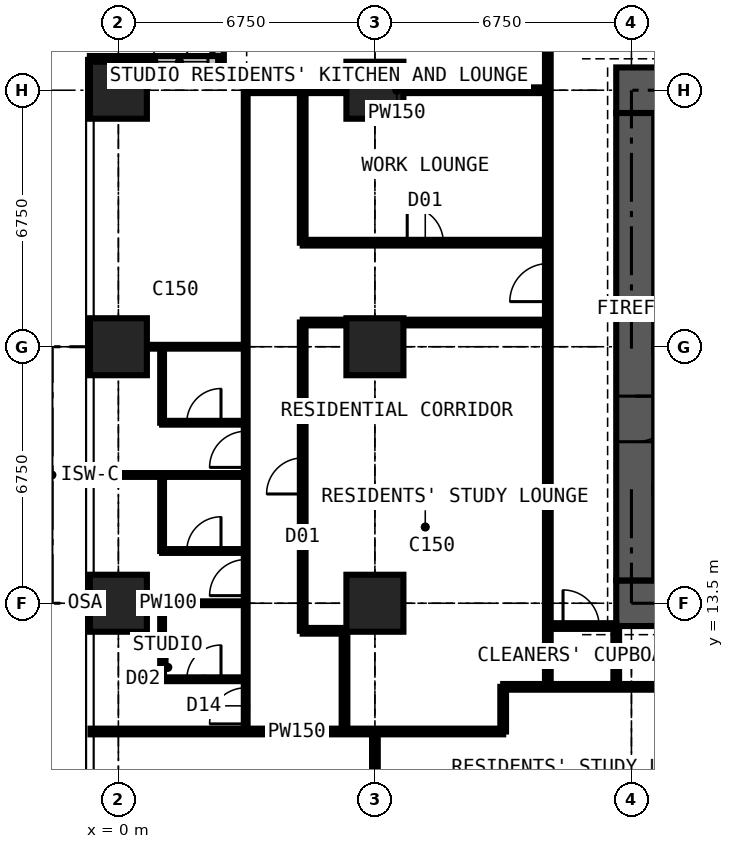
"""IFC4 building model, lengths in metres.
Left out: names, types, materials, properties, quantities, classifications, styles, units other than length and angle.
Written with IfcOpenShell. Run it as: python <this file> out.ifc"""

import sys

from ifc_helpers import new_model, si_unit, direction, frame, frame_2d, origin, origin_2d, place, context, subcontext, project, spatial, rectangle, extrude, element, fill, save


model = new_model("IFC4")
c1 = context("Model", 3, precision=1e-05, world=origin(), true_north=direction((0.0, 1.0)))
c2 = subcontext(c1, "Body", "Model", "MODEL_VIEW")
j1 = project(units=[si_unit("LENGTHUNIT", "METRE"), si_unit("PLANEANGLEUNIT", "RADIAN")], contexts=[c1])
p1 = place(None, origin())
s1 = spatial("IfcSite", under=j1, at=p1, CompositionType="ELEMENT")
p2 = place(p1, origin())
s2 = spatial("IfcBuilding", under=s1, at=p2, CompositionType="ELEMENT")
p3 = place(p2, frame((0.0, 0.0, 167.4)))
s3 = spatial("IfcBuildingStorey", under=s2, at=p3, CompositionType="ELEMENT", Elevation=167.4)
for number, where, z_axis, x_axis in (
    (1, (0.0, 13.5, 0.0), (0.0, 0.0, 1.0), (1.0, 0.0, 0.0)),
    (2, (0.0, 20.25, 0.0), (0.0, 0.0, 1.0), (1.0, 0.0, 0.0)),
    (3, (0.0, 27.0, 0.0), (0.0, 0.0, 1.0), (1.0, 0.0, 0.0)),
    (4, (6.75, 13.5, 0.0), (0.0, 0.0, 1.0), (1.0, 0.0, 0.0)),
    (5, (6.75, 20.25, 0.0), (0.0, 0.0, 1.0), (1.0, 0.0, 0.0)),
    (6, (6.75, 27.0, 0.0), (0.0, 0.0, 1.0), (1.0, 0.0, 0.0)),
):
    element("IfcColumn", number, at=place(p3, frame(where, z_axis=z_axis, x_axis=x_axis)), inside=s3, PredefinedType="COLUMN", context=c2, shape_type="SweptSolid", body=[
        extrude(rectangle(XDim=1.5, YDim=1.5, at=origin_2d()), origin(), (0.0, 0.0, 1.0), 3.6),
    ])
p4 = place(p3, frame((13.1, 13.5, 0.0), z_axis=(0.0, 0.0, 1.0), x_axis=(1.0, 0.0, 0.0)))
e7 = element("IfcWall", 7, at=p4, inside=s3, PredefinedType="SHEAR", context=c2, shape_type="SweptSolid", body=[
    extrude(rectangle(XDim=14.3, YDim=1.2, at=frame_2d((7.15, 0.0))), origin(), (0.0, 0.0, 1.0), 3.6),
])
p5 = place(p3, frame((27.4, 27.0, 0.0), z_axis=(0.0, 0.0, 1.0), x_axis=(-1.0, 0.0, 0.0)))
e8 = element("IfcWall", 8, at=p5, inside=s3, PredefinedType="SHEAR", context=c2, shape_type="SweptSolid", body=[
    extrude(rectangle(XDim=14.3, YDim=1.2, at=frame_2d((7.15, 0.0))), origin(), (0.0, 0.0, 1.0), 3.6),
])
p6 = place(p5, frame((4.55, 0.0, 0.0)))
e9 = element("IfcOpeningElement", 9, at=p6, cuts=e8, PredefinedType="OPENING", context=c2, shape_type="SweptSolid", body=[
    extrude(rectangle(XDim=0.9, YDim=2.2, at=frame_2d((0.45, 1.1))), frame((0.0, 0.61, 0.0), z_axis=(0.0, -1.0, 0.0), x_axis=(1.0, 0.0, 0.0)), (0.0, 0.0, 1.0), 1.22),
])
p7 = place(p5, frame((7.525, 0.0, 0.0)))
e10 = element("IfcOpeningElement", 10, at=p7, cuts=e8, PredefinedType="OPENING", context=c2, shape_type="SweptSolid", body=[
    extrude(rectangle(XDim=1.0, YDim=2.2, at=frame_2d((0.5, 1.1))), frame((0.0, 0.61, 0.0), z_axis=(0.0, -1.0, 0.0), x_axis=(1.0, 0.0, 0.0)), (0.0, 0.0, 1.0), 1.22),
])
p8 = place(p3, frame((13.6, 26.4, 0.0), z_axis=(0.0, 0.0, 1.0), x_axis=(0.0, -1.0, 0.0)))
e11 = element("IfcWall", 11, at=p8, inside=s3, PredefinedType="SHEAR", context=c2, shape_type="SweptSolid", body=[
    extrude(rectangle(XDim=12.3, YDim=1.0, at=frame_2d((6.15, 0.0))), origin(), (0.0, 0.0, 1.0), 3.6),
])
p9 = place(p8, frame((7.45, 0.0, 0.0)))
e12 = element("IfcOpeningElement", 12, at=p9, cuts=e11, PredefinedType="OPENING", context=c2, shape_type="SweptSolid", body=[
    extrude(rectangle(XDim=1.2, YDim=2.2, at=frame_2d((0.6, 1.1))), frame((0.0, 0.51, 0.0), z_axis=(0.0, -1.0, 0.0), x_axis=(1.0, 0.0, 0.0)), (0.0, 0.0, 1.0), 1.02),
])
p10 = place(p3, frame((2.625, 31.125, 0.0), z_axis=(0.0, 0.0, 1.0), x_axis=(0.0, -1.0, 0.0)))
e13 = element("IfcWall", 13, at=p10, inside=s3, PredefinedType="SOLIDWALL", context=c2, shape_type="SweptSolid", body=[
    extrude(rectangle(XDim=3.375, YDim=0.3, at=frame_2d((1.688, 0.0))), origin(), (0.0, 0.0, 1.0), 3.375),
])
p11 = place(p10, frame((0.788, 0.0, 0.6)))
e14 = element("IfcOpeningElement", 14, at=p11, cuts=e13, PredefinedType="OPENING", context=c2, shape_type="SweptSolid", body=[
    extrude(rectangle(XDim=1.8, YDim=2.1, at=frame_2d((0.9, 1.05))), frame((0.0, 0.16, 0.0), z_axis=(0.0, -1.0, 0.0), x_axis=(1.0, 0.0, 0.0)), (0.0, 0.0, 1.0), 0.32),
])
p12 = place(p3, frame((2.625, 27.75, 0.0), z_axis=(0.0, 0.0, 1.0), x_axis=(-1.0, 0.0, 0.0)))
e15 = element("IfcWall", 15, at=p12, inside=s3, PredefinedType="SOLIDWALL", context=c2, shape_type="SweptSolid", body=[
    extrude(rectangle(XDim=3.375, YDim=0.3, at=frame_2d((1.688, 0.0))), origin(), (0.0, 0.0, 1.0), 3.375),
])
p13 = place(p12, frame((0.268, 0.0, 0.9)))
e16 = element("IfcOpeningElement", 16, at=p13, cuts=e15, PredefinedType="OPENING", context=c2, shape_type="SweptSolid", body=[
    extrude(rectangle(XDim=1.5, YDim=1.8, at=frame_2d((0.75, 0.9))), frame((0.0, 0.16, 0.0), z_axis=(0.0, -1.0, 0.0), x_axis=(1.0, 0.0, 0.0)), (0.0, 0.0, 1.0), 0.32),
])
p14 = place(p3, frame((-0.734, 10.125, 0.0), z_axis=(0.0, 0.0, 1.0), x_axis=(1.0, 0.0, 0.0)))
e17 = element("IfcWall", 17, at=p14, inside=s3, PredefinedType="PARTITIONING", context=c2, shape_type="SweptSolid", body=[
    extrude(rectangle(XDim=10.859, YDim=0.15, at=frame_2d((5.429, 0.0))), origin(), (0.0, 0.0, 1.0), 3.375),
])
p15 = place(p3, frame((-0.734, 13.5, 0.0), z_axis=(0.0, 0.0, 1.0), x_axis=(1.0, 0.0, 0.0)))
e18 = element("IfcWall", 18, at=p15, inside=s3, PredefinedType="PARTITIONING", context=c2, shape_type="SweptSolid", body=[
    extrude(rectangle(XDim=4.084, YDim=0.1, at=frame_2d((2.042, 0.0))), origin(), (0.0, 0.0, 1.0), 2.61),
])
p16 = place(p3, frame((-0.734, 16.875, 0.0), z_axis=(0.0, 0.0, 1.0), x_axis=(1.0, 0.0, 0.0)))
e19 = element("IfcWall", 19, at=p16, inside=s3, PredefinedType="PARTITIONING", context=c2, shape_type="SweptSolid", body=[
    extrude(rectangle(XDim=4.084, YDim=0.1, at=frame_2d((2.042, 0.0))), origin(), (0.0, 0.0, 1.0), 3.375),
])
p17 = place(p3, frame((-0.734, 20.25, 0.0), z_axis=(0.0, 0.0, 1.0), x_axis=(1.0, 0.0, 0.0)))
e20 = element("IfcWall", 20, at=p17, inside=s3, PredefinedType="PARTITIONING", context=c2, shape_type="SweptSolid", body=[
    extrude(rectangle(XDim=4.084, YDim=0.1, at=frame_2d((2.042, 0.0))), origin(), (0.0, 0.0, 1.0), 2.61),
])
p18 = place(p3, frame((1.15, 11.5, 0.0), z_axis=(0.0, 0.0, 1.0), x_axis=(0.0, 1.0, 0.0)))
e21 = element("IfcWall", 21, at=p18, inside=s3, PredefinedType="PARTITIONING", context=c2, shape_type="SweptSolid", body=[
    extrude(rectangle(XDim=2.0, YDim=0.1, at=frame_2d((1.0, 0.0))), origin(), (0.0, 0.0, 1.0), 3.375),
])
p19 = place(p3, frame((1.15, 11.5, 0.0), z_axis=(0.0, 0.0, 1.0), x_axis=(1.0, 0.0, 0.0)))
e22 = element("IfcWall", 22, at=p19, inside=s3, PredefinedType="PARTITIONING", context=c2, shape_type="SweptSolid", body=[
    extrude(rectangle(XDim=2.2, YDim=0.1, at=frame_2d((1.1, 0.0))), origin(), (0.0, 0.0, 1.0), 3.375),
])
p20 = place(p19, frame((0.65, 0.0, 0.0)))
e23 = element("IfcOpeningElement", 23, at=p20, cuts=e22, PredefinedType="OPENING", context=c2, shape_type="SweptSolid", body=[
    extrude(rectangle(XDim=0.9, YDim=2.2, at=frame_2d((0.45, 1.1))), frame((0.0, 0.06, 0.0), z_axis=(0.0, -1.0, 0.0), x_axis=(1.0, 0.0, 0.0)), (0.0, 0.0, 1.0), 0.12),
])
p21 = place(p3, frame((1.15, 14.875, 0.0), z_axis=(0.0, 0.0, 1.0), x_axis=(0.0, 1.0, 0.0)))
e24 = element("IfcWall", 24, at=p21, inside=s3, PredefinedType="PARTITIONING", context=c2, shape_type="SweptSolid", body=[
    extrude(rectangle(XDim=2.0, YDim=0.1, at=frame_2d((1.0, 0.0))), origin(), (0.0, 0.0, 1.0), 3.375),
])
p22 = place(p3, frame((1.15, 14.875, 0.0), z_axis=(0.0, 0.0, 1.0), x_axis=(1.0, 0.0, 0.0)))
e25 = element("IfcWall", 25, at=p22, inside=s3, PredefinedType="PARTITIONING", context=c2, shape_type="SweptSolid", body=[
    extrude(rectangle(XDim=2.2, YDim=0.1, at=frame_2d((1.1, 0.0))), origin(), (0.0, 0.0, 1.0), 3.375),
])
p23 = place(p22, frame((0.65, 0.0, 0.0)))
e26 = element("IfcOpeningElement", 26, at=p23, cuts=e25, PredefinedType="OPENING", context=c2, shape_type="SweptSolid", body=[
    extrude(rectangle(XDim=0.9, YDim=2.2, at=frame_2d((0.45, 1.1))), frame((0.0, 0.06, 0.0), z_axis=(0.0, -1.0, 0.0), x_axis=(1.0, 0.0, 0.0)), (0.0, 0.0, 1.0), 0.12),
])
p24 = place(p3, frame((1.15, 18.25, 0.0), z_axis=(0.0, 0.0, 1.0), x_axis=(0.0, 1.0, 0.0)))
e27 = element("IfcWall", 27, at=p24, inside=s3, PredefinedType="PARTITIONING", context=c2, shape_type="SweptSolid", body=[
    extrude(rectangle(XDim=2.0, YDim=0.1, at=frame_2d((1.0, 0.0))), origin(), (0.0, 0.0, 1.0), 3.375),
])
p25 = place(p3, frame((1.15, 18.25, 0.0), z_axis=(0.0, 0.0, 1.0), x_axis=(1.0, 0.0, 0.0)))
e28 = element("IfcWall", 28, at=p25, inside=s3, PredefinedType="PARTITIONING", context=c2, shape_type="SweptSolid", body=[
    extrude(rectangle(XDim=2.2, YDim=0.1, at=frame_2d((1.1, 0.0))), origin(), (0.0, 0.0, 1.0), 3.375),
])
p26 = place(p25, frame((0.65, 0.0, 0.0)))
e29 = element("IfcOpeningElement", 29, at=p26, cuts=e28, PredefinedType="OPENING", context=c2, shape_type="SweptSolid", body=[
    extrude(rectangle(XDim=0.9, YDim=2.2, at=frame_2d((0.45, 1.1))), frame((0.0, 0.06, 0.0), z_axis=(0.0, -1.0, 0.0), x_axis=(1.0, 0.0, 0.0)), (0.0, 0.0, 1.0), 0.12),
])
p27 = place(p3, frame((3.35, 10.125, 0.0), z_axis=(0.0, 0.0, 1.0), x_axis=(0.0, 1.0, 0.0)))
e30 = element("IfcWall", 30, at=p27, inside=s3, PredefinedType="PARTITIONING", context=c2, shape_type="SweptSolid", body=[
    extrude(rectangle(XDim=16.875, YDim=0.1, at=frame_2d((8.438, 0.0))), origin(), (0.0, 0.0, 1.0), 3.375),
])
p28 = place(p27, frame((0.2, 0.0, 0.0)))
e31 = element("IfcOpeningElement", 31, at=p28, cuts=e30, PredefinedType="OPENING", context=c2, shape_type="SweptSolid", body=[
    extrude(rectangle(XDim=0.95, YDim=2.2, at=frame_2d((0.475, 1.1))), frame((0.0, 0.06, 0.0), z_axis=(0.0, -1.0, 0.0), x_axis=(1.0, 0.0, 0.0)), (0.0, 0.0, 1.0), 0.12),
])
p29 = place(p27, frame((3.575, 0.0, 0.0)))
e32 = element("IfcOpeningElement", 32, at=p29, cuts=e30, PredefinedType="OPENING", context=c2, shape_type="SweptSolid", body=[
    extrude(rectangle(XDim=0.95, YDim=2.2, at=frame_2d((0.475, 1.1))), frame((0.0, 0.06, 0.0), z_axis=(0.0, -1.0, 0.0), x_axis=(1.0, 0.0, 0.0)), (0.0, 0.0, 1.0), 0.12),
])
p30 = place(p27, frame((6.95, 0.0, 0.0)))
e33 = element("IfcOpeningElement", 33, at=p30, cuts=e30, PredefinedType="OPENING", context=c2, shape_type="SweptSolid", body=[
    extrude(rectangle(XDim=0.95, YDim=2.2, at=frame_2d((0.475, 1.1))), frame((0.0, 0.06, 0.0), z_axis=(0.0, -1.0, 0.0), x_axis=(1.0, 0.0, 0.0)), (0.0, 0.0, 1.0), 0.12),
])
p31 = place(p3, frame((3.35, 27.0, 0.0), z_axis=(0.0, 0.0, 1.0), x_axis=(1.0, 0.0, 0.0)))
e34 = element("IfcWall", 34, at=p31, inside=s3, PredefinedType="PARTITIONING", context=c2, shape_type="SweptSolid", body=[
    extrude(rectangle(XDim=7.95, YDim=0.15, at=frame_2d((3.975, 0.0))), origin(), (0.0, 0.0, 1.0), 2.806),
])
p32 = place(p3, frame((4.85, 12.775, 0.0), z_axis=(0.0, 0.0, 1.0), x_axis=(0.0, 1.0, 0.0)))
e35 = element("IfcWall", 35, at=p32, inside=s3, PredefinedType="PARTITIONING", context=c2, shape_type="SweptSolid", body=[
    extrude(rectangle(XDim=8.113, YDim=0.15, at=frame_2d((4.056, 0.0))), origin(), (0.0, 0.0, 1.0), 3.375),
])
p33 = place(p32, frame((3.6, 0.0, 0.0)))
e36 = element("IfcOpeningElement", 36, at=p33, cuts=e35, PredefinedType="OPENING", context=c2, shape_type="SweptSolid", body=[
    extrude(rectangle(XDim=0.95, YDim=2.2, at=frame_2d((0.475, 1.1))), frame((0.0, 0.085, 0.0), z_axis=(0.0, -1.0, 0.0), x_axis=(1.0, 0.0, 0.0)), (0.0, 0.0, 1.0), 0.17),
])
p34 = place(p3, frame((4.85, 12.775, 0.0), z_axis=(0.0, 0.0, 1.0), x_axis=(1.0, 0.0, 0.0)))
e37 = element("IfcWall", 37, at=p34, inside=s3, PredefinedType="PARTITIONING", context=c2, shape_type="SweptSolid", body=[
    extrude(rectangle(XDim=1.1, YDim=0.15, at=frame_2d((0.55, 0.0))), origin(), (0.0, 0.0, 1.0), 3.375),
])
p35 = place(p3, frame((4.85, 20.887, 0.0), z_axis=(0.0, 0.0, 1.0), x_axis=(1.0, 0.0, 0.0)))
e38 = element("IfcWall", 38, at=p35, inside=s3, PredefinedType="PARTITIONING", context=c2, shape_type="SweptSolid", body=[
    extrude(rectangle(XDim=6.45, YDim=0.15, at=frame_2d((3.225, 0.0))), origin(), (0.0, 0.0, 1.0), 3.375),
])
p36 = place(p3, frame((4.85, 22.988, 0.0), z_axis=(0.0, 0.0, 1.0), x_axis=(0.0, 1.0, 0.0)))
e39 = element("IfcWall", 39, at=p36, inside=s3, PredefinedType="PARTITIONING", context=c2, shape_type="SweptSolid", body=[
    extrude(rectangle(XDim=4.012, YDim=0.15, at=frame_2d((2.006, 0.0))), origin(), (0.0, 0.0, 1.0), 3.375),
])
p37 = place(p3, frame((4.85, 22.988, 0.0), z_axis=(0.0, 0.0, 1.0), x_axis=(1.0, 0.0, 0.0)))
e40 = element("IfcWall", 40, at=p37, inside=s3, PredefinedType="PARTITIONING", context=c2, shape_type="SweptSolid", body=[
    extrude(rectangle(XDim=6.45, YDim=0.15, at=frame_2d((3.225, 0.0))), origin(), (0.0, 0.0, 1.0), 3.375),
])
p38 = place(p37, frame((2.75, 0.0, 0.0)))
e41 = element("IfcOpeningElement", 41, at=p38, cuts=e40, PredefinedType="OPENING", context=c2, shape_type="SweptSolid", body=[
    extrude(rectangle(XDim=0.95, YDim=2.2, at=frame_2d((0.475, 1.1))), frame((0.0, 0.085, 0.0), z_axis=(0.0, -1.0, 0.0), x_axis=(1.0, 0.0, 0.0)), (0.0, 0.0, 1.0), 0.17),
])
p39 = place(p3, frame((5.95, 10.125, 0.0), z_axis=(0.0, 0.0, 1.0), x_axis=(0.0, 1.0, 0.0)))
e42 = element("IfcWall", 42, at=p39, inside=s3, PredefinedType="PARTITIONING", context=c2, shape_type="SweptSolid", body=[
    extrude(rectangle(XDim=2.65, YDim=0.15, at=frame_2d((1.325, 0.0))), origin(), (0.0, 0.0, 1.0), 3.375),
])
p40 = place(p3, frame((6.75, 3.35, 0.0), z_axis=(0.0, 0.0, 1.0), x_axis=(0.0, 1.0, 0.0)))
e43 = element("IfcWall", 43, at=p40, inside=s3, PredefinedType="PARTITIONING", context=c2, shape_type="SweptSolid", body=[
    extrude(rectangle(XDim=6.775, YDim=0.15, at=frame_2d((3.387, 0.0))), origin(), (0.0, 0.0, 1.0), 2.877),
])
p41 = place(p3, frame((10.125, 10.125, 0.0), z_axis=(0.0, 0.0, 1.0), x_axis=(0.0, 1.0, 0.0)))
e44 = element("IfcWall", 44, at=p41, inside=s3, PredefinedType="PARTITIONING", context=c2, shape_type="SweptSolid", body=[
    extrude(rectangle(XDim=1.175, YDim=0.15, at=frame_2d((0.587, 0.0))), origin(), (0.0, 0.0, 1.0), 3.375),
])
p42 = place(p3, frame((10.125, 11.3, 0.0), z_axis=(0.0, 0.0, 1.0), x_axis=(1.0, 0.0, 0.0)))
e45 = element("IfcWall", 45, at=p42, inside=s3, PredefinedType="PARTITIONING", context=c2, shape_type="SweptSolid", body=[
    extrude(rectangle(XDim=20.25, YDim=0.15, at=frame_2d((10.125, 0.0))), origin(), (0.0, 0.0, 1.0), 3.375),
])
p43 = place(p42, frame((8.375, 0.0, 0.0)))
e46 = element("IfcOpeningElement", 46, at=p43, cuts=e45, PredefinedType="OPENING", context=c2, shape_type="SweptSolid", body=[
    extrude(rectangle(XDim=1.0, YDim=2.2, at=frame_2d((0.5, 1.1))), frame((0.0, 0.085, 0.0), z_axis=(0.0, -1.0, 0.0), x_axis=(1.0, 0.0, 0.0)), (0.0, 0.0, 1.0), 0.17),
])
p44 = place(p42, frame((10.975, 0.0, 0.0)))
e47 = element("IfcOpeningElement", 47, at=p44, cuts=e45, PredefinedType="OPENING", context=c2, shape_type="SweptSolid", body=[
    extrude(rectangle(XDim=1.0, YDim=2.2, at=frame_2d((0.5, 1.1))), frame((0.0, 0.085, 0.0), z_axis=(0.0, -1.0, 0.0), x_axis=(1.0, 0.0, 0.0)), (0.0, 0.0, 1.0), 0.17),
])
p45 = place(p42, frame((4.875, 0.0, 0.0)))
e48 = element("IfcOpeningElement", 48, at=p45, cuts=e45, PredefinedType="OPENING", context=c2, shape_type="SweptSolid", body=[
    extrude(rectangle(XDim=0.95, YDim=2.2, at=frame_2d((0.475, 1.1))), frame((0.0, 0.085, 0.0), z_axis=(0.0, -1.0, 0.0), x_axis=(1.0, 0.0, 0.0)), (0.0, 0.0, 1.0), 0.17),
])
p46 = place(p3, frame((11.3, 11.3, 0.0), z_axis=(0.0, 0.0, 1.0), x_axis=(0.0, 1.0, 0.0)))
e49 = element("IfcWall", 49, at=p46, inside=s3, PredefinedType="PARTITIONING", context=c2, shape_type="SweptSolid", body=[
    extrude(rectangle(XDim=19.3, YDim=0.15, at=frame_2d((9.65, 0.0))), origin(), (0.0, 0.0, 1.0), 3.375),
])
p47 = place(p46, frame((18.1, 0.0, 0.0)))
e50 = element("IfcOpeningElement", 50, at=p47, cuts=e49, PredefinedType="OPENING", context=c2, shape_type="SweptSolid", body=[
    extrude(rectangle(XDim=1.0, YDim=2.2, at=frame_2d((0.5, 1.1))), frame((0.0, 0.085, 0.0), z_axis=(0.0, -1.0, 0.0), x_axis=(1.0, 0.0, 0.0)), (0.0, 0.0, 1.0), 0.17),
])
p48 = place(p46, frame((10.137, 0.0, 0.0)))
e51 = element("IfcOpeningElement", 51, at=p48, cuts=e49, PredefinedType="OPENING", context=c2, shape_type="SweptSolid", body=[
    extrude(rectangle(XDim=1.0, YDim=2.2, at=frame_2d((0.5, 1.1))), frame((0.0, 0.085, 0.0), z_axis=(0.0, -1.0, 0.0), x_axis=(1.0, 0.0, 0.0)), (0.0, 0.0, 1.0), 0.17),
])
p49 = place(p3, frame((11.3, 12.9, 0.0), z_axis=(0.0, 0.0, 1.0), x_axis=(1.0, 0.0, 0.0)))
e52 = element("IfcWall", 52, at=p49, inside=s3, PredefinedType="PARTITIONING", context=c2, shape_type="SweptSolid", body=[
    extrude(rectangle(XDim=1.8, YDim=0.15, at=frame_2d((0.9, 0.0))), origin(), (0.0, 0.0, 1.0), 2.806),
])
p50 = place(p49, frame((0.4, 0.0, 0.0)))
e53 = element("IfcOpeningElement", 53, at=p50, cuts=e52, PredefinedType="OPENING", context=c2, shape_type="SweptSolid", body=[
    extrude(rectangle(XDim=0.95, YDim=2.2, at=frame_2d((0.475, 1.1))), frame((0.0, 0.085, 0.0), z_axis=(0.0, -1.0, 0.0), x_axis=(1.0, 0.0, 0.0)), (0.0, 0.0, 1.0), 0.17),
])
p51 = place(p3, frame((13.1, 11.3, 0.0), z_axis=(0.0, 0.0, 1.0), x_axis=(0.0, 1.0, 0.0)))
e54 = element("IfcWall", 54, at=p51, inside=s3, PredefinedType="PARTITIONING", context=c2, shape_type="SweptSolid", body=[
    extrude(rectangle(XDim=1.6, YDim=0.15, at=frame_2d((0.8, 0.0))), origin(), (0.0, 0.0, 1.0), 3.375),
])
p52 = place(p13, origin())
e55 = element("IfcWindow", 55, at=p52, inside=s3, PartitioningType="SINGLE_PANEL", PredefinedType="WINDOW", context=c2, shape_type="SweptSolid", body=[
    extrude(rectangle(XDim=1.5, YDim=1.8, at=frame_2d((0.75, 0.9))), frame((0.0, 0.03, 0.0), z_axis=(0.0, -1.0, 0.0), x_axis=(1.0, 0.0, 0.0)), (0.0, 0.0, 1.0), 0.06),
])
fill(e16, e55)
p53 = place(p9, origin())
e56 = element("IfcDoor", 56, at=p53, inside=s3, OperationType="DOUBLE_DOOR_SINGLE_SWING", PredefinedType="DOOR", context=c2, shape_type="SweptSolid", body=[
    extrude(rectangle(XDim=1.2, YDim=2.2, at=frame_2d((0.6, 1.1))), frame((0.0, 0.025, 0.0), z_axis=(0.0, -1.0, 0.0), x_axis=(1.0, 0.0, 0.0)), (0.0, 0.0, 1.0), 0.05),
])
fill(e12, e56)
p54 = place(p50, origin())
e57 = element("IfcDoor", 57, at=p54, inside=s3, OperationType="SINGLE_SWING_LEFT", PredefinedType="DOOR", context=c2, shape_type="SweptSolid", body=[
    extrude(rectangle(XDim=0.95, YDim=2.2, at=frame_2d((0.475, 1.1))), frame((0.0, 0.025, 0.0), z_axis=(0.0, -1.0, 0.0), x_axis=(1.0, 0.0, 0.0)), (0.0, 0.0, 1.0), 0.05),
])
fill(e53, e57)
p55 = place(p28, origin())
e58 = element("IfcDoor", 58, at=p55, inside=s3, OperationType="SINGLE_SWING_LEFT", PredefinedType="DOOR", context=c2, shape_type="SweptSolid", body=[
    extrude(rectangle(XDim=0.95, YDim=2.2, at=frame_2d((0.475, 1.1))), frame((0.0, 0.025, 0.0), z_axis=(0.0, -1.0, 0.0), x_axis=(1.0, 0.0, 0.0)), (0.0, 0.0, 1.0), 0.05),
])
fill(e31, e58)
p56 = place(p20, origin())
e59 = element("IfcDoor", 59, at=p56, inside=s3, OperationType="SINGLE_SWING_RIGHT", PredefinedType="DOOR", context=c2, shape_type="SweptSolid", body=[
    extrude(rectangle(XDim=0.9, YDim=2.2, at=frame_2d((0.45, 1.1))), frame((0.0, 0.025, 0.0), z_axis=(0.0, -1.0, 0.0), x_axis=(1.0, 0.0, 0.0)), (0.0, 0.0, 1.0), 0.05),
])
fill(e23, e59)
p57 = place(p29, origin())
e60 = element("IfcDoor", 60, at=p57, inside=s3, OperationType="SINGLE_SWING_LEFT", PredefinedType="DOOR", context=c2, shape_type="SweptSolid", body=[
    extrude(rectangle(XDim=0.95, YDim=2.2, at=frame_2d((0.475, 1.1))), frame((0.0, 0.025, 0.0), z_axis=(0.0, -1.0, 0.0), x_axis=(1.0, 0.0, 0.0)), (0.0, 0.0, 1.0), 0.05),
])
fill(e32, e60)
p58 = place(p23, origin())
e61 = element("IfcDoor", 61, at=p58, inside=s3, OperationType="SINGLE_SWING_RIGHT", PredefinedType="DOOR", context=c2, shape_type="SweptSolid", body=[
    extrude(rectangle(XDim=0.9, YDim=2.2, at=frame_2d((0.45, 1.1))), frame((0.0, 0.025, 0.0), z_axis=(0.0, -1.0, 0.0), x_axis=(1.0, 0.0, 0.0)), (0.0, 0.0, 1.0), 0.05),
])
fill(e26, e61)
p59 = place(p30, origin())
e62 = element("IfcDoor", 62, at=p59, inside=s3, OperationType="SINGLE_SWING_LEFT", PredefinedType="DOOR", context=c2, shape_type="SweptSolid", body=[
    extrude(rectangle(XDim=0.95, YDim=2.2, at=frame_2d((0.475, 1.1))), frame((0.0, 0.025, 0.0), z_axis=(0.0, -1.0, 0.0), x_axis=(1.0, 0.0, 0.0)), (0.0, 0.0, 1.0), 0.05),
])
fill(e33, e62)
p60 = place(p26, origin())
e63 = element("IfcDoor", 63, at=p60, inside=s3, OperationType="SINGLE_SWING_RIGHT", PredefinedType="DOOR", context=c2, shape_type="SweptSolid", body=[
    extrude(rectangle(XDim=0.9, YDim=2.2, at=frame_2d((0.45, 1.1))), frame((0.0, 0.025, 0.0), z_axis=(0.0, -1.0, 0.0), x_axis=(1.0, 0.0, 0.0)), (0.0, 0.0, 1.0), 0.05),
])
fill(e29, e63)
p61 = place(p48, origin())
e64 = element("IfcDoor", 64, at=p61, inside=s3, OperationType="SINGLE_SWING_LEFT", PredefinedType="DOOR", context=c2, shape_type="SweptSolid", body=[
    extrude(rectangle(XDim=1.0, YDim=2.2, at=frame_2d((0.5, 1.1))), frame((0.0, 0.025, 0.0), z_axis=(0.0, -1.0, 0.0), x_axis=(1.0, 0.0, 0.0)), (0.0, 0.0, 1.0), 0.05),
])
fill(e51, e64)
p62 = place(p33, origin())
e65 = element("IfcDoor", 65, at=p62, inside=s3, OperationType="SINGLE_SWING_LEFT", PredefinedType="DOOR", context=c2, shape_type="SweptSolid", body=[
    extrude(rectangle(XDim=0.95, YDim=2.2, at=frame_2d((0.475, 1.1))), frame((0.0, 0.025, 0.0), z_axis=(0.0, -1.0, 0.0), x_axis=(1.0, 0.0, 0.0)), (0.0, 0.0, 1.0), 0.05),
])
fill(e36, e65)
p63 = place(p38, origin())
e66 = element("IfcDoor", 66, at=p63, inside=s3, OperationType="SINGLE_SWING_LEFT", PredefinedType="DOOR", context=c2, shape_type="SweptSolid", body=[
    extrude(rectangle(XDim=0.95, YDim=2.2, at=frame_2d((0.475, 1.1))), frame((0.0, 0.025, 0.0), z_axis=(0.0, -1.0, 0.0), x_axis=(1.0, 0.0, 0.0)), (0.0, 0.0, 1.0), 0.05),
])
fill(e41, e66)
save(model, sys.argv[1])
